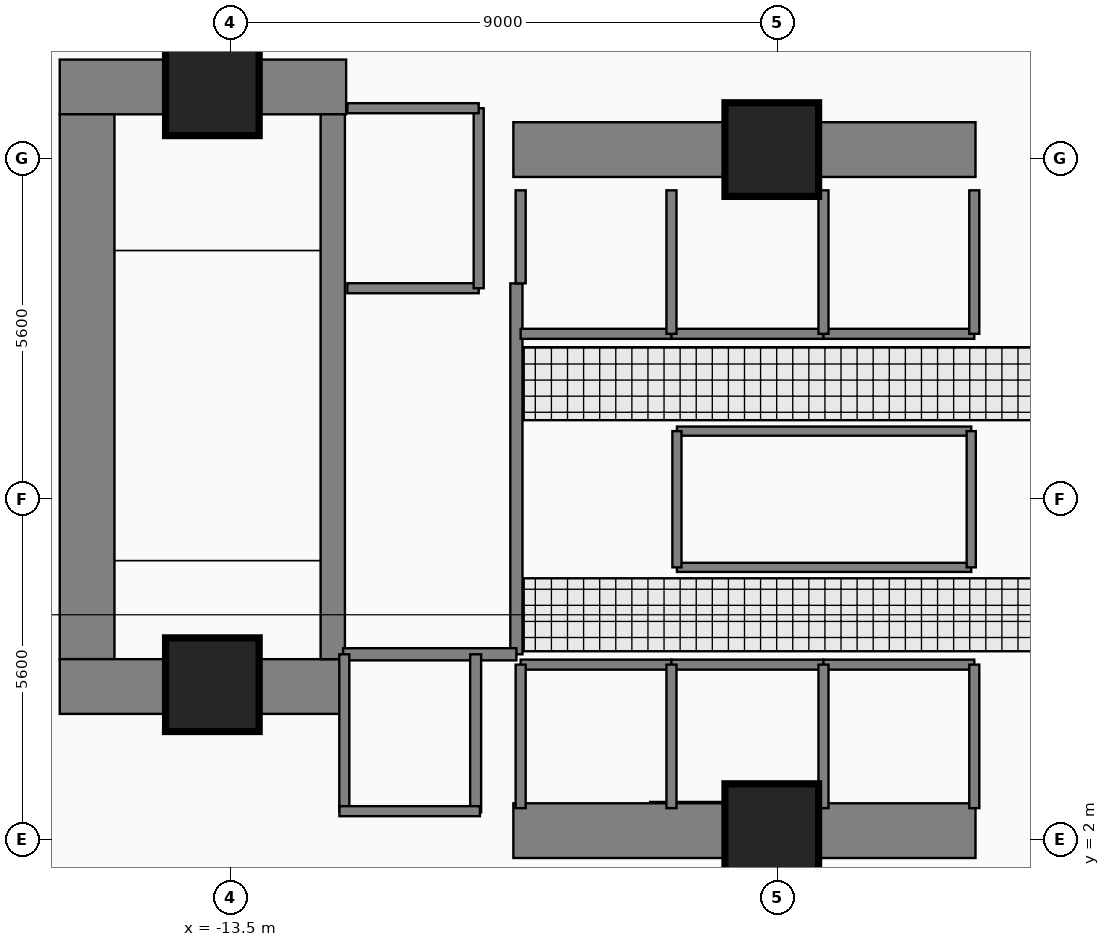
"""IFC4 building model, lengths in metres.
Left out: names, types, materials, properties, quantities, classifications, styles, units other than length and angle.
Written with IfcOpenShell. Run it as: python <this file> out.ifc"""

import sys

from ifc_helpers import new_model, si_unit, direction, frame, frame_2d, origin, origin_2d, place, context, subcontext, project, spatial, rectangle, extrude, element, fill, save


model = new_model("IFC4")
c1 = context("Model", 3, precision=1e-05, world=origin(), true_north=direction((0.0, 1.0)))
c2 = subcontext(c1, "Body", "Model", "MODEL_VIEW")
j1 = project(units=[si_unit("LENGTHUNIT", "METRE"), si_unit("PLANEANGLEUNIT", "RADIAN")], contexts=[c1])
p1 = place(None, origin())
s1 = spatial("IfcSite", under=j1, at=p1, CompositionType="ELEMENT")
p2 = place(p1, origin())
s2 = spatial("IfcBuilding", under=s1, at=p2, CompositionType="ELEMENT")
p3 = place(p2, origin())
s3 = spatial("IfcBuildingStorey", under=s2, at=p3, CompositionType="ELEMENT", Elevation=0.0)
p4 = place(p3, frame((-16.31, 14.38, 0.0), z_axis=(0.0, 0.0, 1.0), x_axis=(1.0, 0.0, 0.0)))
e1 = element("IfcWall", 1, at=p4, inside=s3, PredefinedType="SHEAR", context=c2, shape_type="SweptSolid", body=[
    extrude(rectangle(XDim=4.71, YDim=0.9, at=frame_2d((2.355, 0.0))), origin(), (0.0, 0.0, 1.0), 5.81),
])
p5 = place(p3, frame((-15.86, 4.97, 0.0), z_axis=(0.0, 0.0, 1.0), x_axis=(0.0, 1.0, 0.0)))
e2 = element("IfcWall", 2, at=p5, inside=s3, PredefinedType="SHEAR", context=c2, shape_type="SweptSolid", body=[
    extrude(rectangle(XDim=8.96, YDim=0.9, at=frame_2d((4.48, 0.0))), origin(), (0.0, 0.0, 1.0), 5.81),
])
p6 = place(p3, frame((-16.31, 4.52, 0.0), z_axis=(0.0, 0.0, 1.0), x_axis=(1.0, 0.0, 0.0)))
e3 = element("IfcWall", 3, at=p6, inside=s3, PredefinedType="SHEAR", context=c2, shape_type="SweptSolid", body=[
    extrude(rectangle(XDim=4.71, YDim=0.9, at=frame_2d((2.355, 0.0))), origin(), (0.0, 0.0, 1.0), 5.81),
])
for number, where, z_axis, x_axis in (
    (4, (-8.85, 2.15, 0.0), (0.0, 0.0, 1.0), (1.0, 0.0, 0.0)),
    (5, (-8.85, 13.35, 0.0), (0.0, 0.0, 1.0), (1.0, 0.0, 0.0)),
):
    element("IfcWall", number, at=place(p3, frame(where, z_axis=z_axis, x_axis=x_axis)), inside=s3, PredefinedType="SHEAR", context=c2, shape_type="SweptSolid", body=[
        extrude(rectangle(XDim=7.6, YDim=0.9, at=frame_2d((3.8, 0.0))), origin(), (0.0, 0.0, 1.0), 5.75),
    ])
p7 = place(p3, frame((-11.82, 4.97, 0.0), z_axis=(0.0, 0.0, 1.0), x_axis=(0.0, 1.0, 0.0)))
e6 = element("IfcWall", 6, at=p7, inside=s3, PredefinedType="SHEAR", context=c2, shape_type="SweptSolid", body=[
    extrude(rectangle(XDim=8.96, YDim=0.4, at=frame_2d((4.48, 0.0))), origin(), (0.0, 0.0, 1.0), 5.81),
])
p8 = place(p7, frame((0.31, 0.0, 0.0)))
e7 = element("IfcOpeningElement", 7, at=p8, cuts=e6, PredefinedType="OPENING", context=c2, shape_type="SweptSolid", body=[
    extrude(rectangle(XDim=1.12, YDim=2.22, at=frame_2d((0.56, 1.11))), frame((0.0, 0.21, 0.0), z_axis=(0.0, -1.0, 0.0), x_axis=(1.0, 0.0, 0.0)), (0.0, 0.0, 1.0), 0.42),
])
for number, where, z_axis, x_axis in (
    (8, (-13.8, 14.35, 0.0), (0.0, 0.0, 1.0), (1.0, 0.0, 0.0)),
    (9, (-4.6, 13.35, 0.0), (0.0, 0.0, 1.0), (1.0, 0.0, 0.0)),
    (10, (-13.8, 4.55, 0.0), (0.0, 0.0, 1.0), (1.0, 0.0, 0.0)),
    (11, (-4.6, 2.15, 0.0), (0.0, 0.0, 1.0), (1.0, 0.0, 0.0)),
):
    element("IfcColumn", number, at=place(p3, frame(where, z_axis=z_axis, x_axis=x_axis)), inside=s3, PredefinedType="COLUMN", context=c2, shape_type="SweptSolid", body=[
        extrude(rectangle(XDim=1.5, YDim=1.5, at=origin_2d()), origin(), (0.0, 0.0, 1.0), 6.0),
    ])
p9 = place(p3, frame((-8.8, 5.05, 0.0), z_axis=(0.0, 0.0, 1.0), x_axis=(0.0, 1.0, 0.0)))
e12 = element("IfcWall", 12, at=p9, inside=s3, PredefinedType="PARTITIONING", context=c2, shape_type="SweptSolid", body=[
    extrude(rectangle(XDim=6.1, YDim=0.2, at=frame_2d((3.05, 0.0))), origin(), (0.0, 0.0, 1.0), 5.75),
])
p10 = place(p9, frame((0.25, 0.0, 0.0)))
e13 = element("IfcOpeningElement", 13, at=p10, cuts=e12, PredefinedType="OPENING", context=c2, shape_type="SweptSolid", body=[
    extrude(rectangle(XDim=1.1, YDim=2.2, at=frame_2d((0.55, 1.1))), frame((0.0, 0.11, 0.0), z_axis=(0.0, -1.0, 0.0), x_axis=(1.0, 0.0, 0.0)), (0.0, 0.0, 1.0), 0.22),
])
p11 = place(p9, frame((3.85, 0.0, 0.0)))
e14 = element("IfcOpeningElement", 14, at=p11, cuts=e12, PredefinedType="OPENING", context=c2, shape_type="SweptSolid", body=[
    extrude(rectangle(XDim=1.1, YDim=2.2, at=frame_2d((0.55, 1.1))), frame((0.0, 0.11, 0.0), z_axis=(0.0, -1.0, 0.0), x_axis=(1.0, 0.0, 0.0)), (0.0, 0.0, 1.0), 0.22),
])
p12 = place(p3, frame((-11.58, 11.07, 0.0), z_axis=(0.0, 0.0, 1.0), x_axis=(1.0, 0.0, 0.0)))
e15 = element("IfcWall", 15, at=p12, inside=s3, PredefinedType="PARTITIONING", context=c2, shape_type="SweptSolid", body=[
    extrude(rectangle(XDim=2.16, YDim=0.165, at=frame_2d((1.08, 0.0))), origin(), (0.0, 0.0, 1.0), 5.75),
])
p13 = place(p12, frame((0.53, 0.0, 0.0)))
e16 = element("IfcOpeningElement", 16, at=p13, cuts=e15, PredefinedType="OPENING", context=c2, shape_type="SweptSolid", body=[
    extrude(rectangle(XDim=1.15, YDim=2.25, at=frame_2d((0.575, 1.125))), frame((0.0, 0.093, 0.0), z_axis=(0.0, -1.0, 0.0), x_axis=(1.0, 0.0, 0.0)), (0.0, 0.0, 1.0), 0.185),
])
p14 = place(p3, frame((-8.73, 4.88, 0.0), z_axis=(0.0, 0.0, 1.0), x_axis=(1.0, 0.0, 0.0)))
e17 = element("IfcWall", 17, at=p14, inside=s3, PredefinedType="PARTITIONING", context=c2, shape_type="SweptSolid", body=[
    extrude(rectangle(XDim=2.48, YDim=0.165, at=frame_2d((1.24, 0.0))), origin(), (0.0, 0.0, 1.0), 5.75),
])
p15 = place(p14, frame((0.69, 0.0, 0.0)))
e18 = element("IfcOpeningElement", 18, at=p15, cuts=e17, PredefinedType="OPENING", context=c2, shape_type="SweptSolid", body=[
    extrude(rectangle(XDim=1.1, YDim=2.25, at=frame_2d((0.55, 1.125))), frame((0.0, 0.093, 0.0), z_axis=(0.0, -1.0, 0.0), x_axis=(1.0, 0.0, 0.0)), (0.0, 0.0, 1.0), 0.185),
])
p16 = place(p3, frame((-6.25, 4.88, 0.0), z_axis=(0.0, 0.0, 1.0), x_axis=(1.0, 0.0, 0.0)))
e19 = element("IfcWall", 19, at=p16, inside=s3, PredefinedType="PARTITIONING", context=c2, shape_type="SweptSolid", body=[
    extrude(rectangle(XDim=2.5, YDim=0.165, at=frame_2d((1.25, 0.0))), origin(), (0.0, 0.0, 1.0), 5.75),
])
p17 = place(p16, frame((0.7, 0.0, 0.0)))
e20 = element("IfcOpeningElement", 20, at=p17, cuts=e19, PredefinedType="OPENING", context=c2, shape_type="SweptSolid", body=[
    extrude(rectangle(XDim=1.1, YDim=2.25, at=frame_2d((0.55, 1.125))), frame((0.0, 0.093, 0.0), z_axis=(0.0, -1.0, 0.0), x_axis=(1.0, 0.0, 0.0)), (0.0, 0.0, 1.0), 0.185),
])
p18 = place(p3, frame((-8.73, 10.32, 0.0), z_axis=(0.0, 0.0, 1.0), x_axis=(1.0, 0.0, 0.0)))
e21 = element("IfcWall", 21, at=p18, inside=s3, PredefinedType="PARTITIONING", context=c2, shape_type="SweptSolid", body=[
    extrude(rectangle(XDim=2.48, YDim=0.165, at=frame_2d((1.24, 0.0))), origin(), (0.0, 0.0, 1.0), 5.75),
])
p19 = place(p18, frame((0.69, 0.0, 0.0)))
e22 = element("IfcOpeningElement", 22, at=p19, cuts=e21, PredefinedType="OPENING", context=c2, shape_type="SweptSolid", body=[
    extrude(rectangle(XDim=1.1, YDim=2.25, at=frame_2d((0.55, 1.125))), frame((0.0, 0.093, 0.0), z_axis=(0.0, -1.0, 0.0), x_axis=(1.0, 0.0, 0.0)), (0.0, 0.0, 1.0), 0.185),
])
p20 = place(p3, frame((-6.25, 10.32, 0.0), z_axis=(0.0, 0.0, 1.0), x_axis=(1.0, 0.0, 0.0)))
e23 = element("IfcWall", 23, at=p20, inside=s3, PredefinedType="PARTITIONING", context=c2, shape_type="SweptSolid", body=[
    extrude(rectangle(XDim=2.5, YDim=0.165, at=frame_2d((1.25, 0.0))), origin(), (0.0, 0.0, 1.0), 5.75),
])
p21 = place(p20, frame((0.7, 0.0, 0.0)))
e24 = element("IfcOpeningElement", 24, at=p21, cuts=e23, PredefinedType="OPENING", context=c2, shape_type="SweptSolid", body=[
    extrude(rectangle(XDim=1.1, YDim=2.25, at=frame_2d((0.55, 1.125))), frame((0.0, 0.093, 0.0), z_axis=(0.0, -1.0, 0.0), x_axis=(1.0, 0.0, 0.0)), (0.0, 0.0, 1.0), 0.185),
])
p22 = place(p3, frame((-3.75, 4.88, 0.0), z_axis=(0.0, 0.0, 1.0), x_axis=(1.0, 0.0, 0.0)))
e25 = element("IfcWall", 25, at=p22, inside=s3, PredefinedType="PARTITIONING", context=c2, shape_type="SweptSolid", body=[
    extrude(rectangle(XDim=2.48, YDim=0.165, at=frame_2d((1.24, 0.0))), origin(), (0.0, 0.0, 1.0), 5.75),
])
p23 = place(p22, frame((0.69, 0.0, 0.0)))
e26 = element("IfcOpeningElement", 26, at=p23, cuts=e25, PredefinedType="OPENING", context=c2, shape_type="SweptSolid", body=[
    extrude(rectangle(XDim=1.1, YDim=2.25, at=frame_2d((0.55, 1.125))), frame((0.0, 0.093, 0.0), z_axis=(0.0, -1.0, 0.0), x_axis=(1.0, 0.0, 0.0)), (0.0, 0.0, 1.0), 0.185),
])
p24 = place(p3, frame((-3.75, 10.32, 0.0), z_axis=(0.0, 0.0, 1.0), x_axis=(1.0, 0.0, 0.0)))
e27 = element("IfcWall", 27, at=p24, inside=s3, PredefinedType="PARTITIONING", context=c2, shape_type="SweptSolid", body=[
    extrude(rectangle(XDim=2.48, YDim=0.165, at=frame_2d((1.24, 0.0))), origin(), (0.0, 0.0, 1.0), 5.75),
])
p25 = place(p24, frame((0.69, 0.0, 0.0)))
e28 = element("IfcOpeningElement", 28, at=p25, cuts=e27, PredefinedType="OPENING", context=c2, shape_type="SweptSolid", body=[
    extrude(rectangle(XDim=1.1, YDim=2.25, at=frame_2d((0.55, 1.125))), frame((0.0, 0.093, 0.0), z_axis=(0.0, -1.0, 0.0), x_axis=(1.0, 0.0, 0.0)), (0.0, 0.0, 1.0), 0.185),
])
p26 = place(p3, frame((-6.16, 6.48, 0.0), z_axis=(0.0, 0.0, 1.0), x_axis=(1.0, 0.0, 0.0)))
e29 = element("IfcWall", 29, at=p26, inside=s3, PredefinedType="PARTITIONING", context=c2, shape_type="SweptSolid", body=[
    extrude(rectangle(XDim=4.84, YDim=0.15, at=frame_2d((2.42, 0.0))), origin(), (0.0, 0.0, 1.0), 5.75),
])
p27 = place(p26, frame((1.97, 0.0, 0.0)))
e30 = element("IfcOpeningElement", 30, at=p27, cuts=e29, PredefinedType="OPENING", context=c2, shape_type="SweptSolid", body=[
    extrude(rectangle(XDim=0.9, YDim=2.15, at=frame_2d((0.45, 1.075))), frame((0.0, 0.085, 0.0), z_axis=(0.0, -1.0, 0.0), x_axis=(1.0, 0.0, 0.0)), (0.0, 0.0, 1.0), 0.17),
])
p28 = place(p3, frame((-11.65, 5.05, 0.0), z_axis=(0.0, 0.0, 1.0), x_axis=(1.0, 0.0, 0.0)))
e31 = element("IfcWall", 31, at=p28, inside=s3, PredefinedType="PARTITIONING", context=c2, shape_type="SweptSolid", body=[
    extrude(rectangle(XDim=2.85, YDim=0.2, at=frame_2d((1.425, 0.0))), origin(), (0.0, 0.0, 1.0), 5.75),
])
p29 = place(p3, frame((-9.42, 11.07, 0.0), z_axis=(0.0, 0.0, 1.0), x_axis=(0.0, 1.0, 0.0)))
e32 = element("IfcWall", 32, at=p29, inside=s3, PredefinedType="PARTITIONING", context=c2, shape_type="SweptSolid", body=[
    extrude(rectangle(XDim=2.96, YDim=0.165, at=frame_2d((1.48, 0.0))), origin(), (0.0, 0.0, 1.0), 5.75),
])
p30 = place(p3, frame((-11.58, 14.03, 0.0), z_axis=(0.0, 0.0, 1.0), x_axis=(1.0, 0.0, 0.0)))
e33 = element("IfcWall", 33, at=p30, inside=s3, PredefinedType="PARTITIONING", context=c2, shape_type="SweptSolid", body=[
    extrude(rectangle(XDim=2.16, YDim=0.165, at=frame_2d((1.08, 0.0))), origin(), (0.0, 0.0, 1.0), 5.75),
])
for number, where, z_axis, x_axis in (
    (34, (-8.73, 2.52, 0.0), (0.0, 0.0, 1.0), (0.0, 1.0, 0.0)),
    (35, (-6.25, 2.52, 0.0), (0.0, 0.0, 1.0), (0.0, 1.0, 0.0)),
    (36, (-3.75, 2.52, 0.0), (0.0, 0.0, 1.0), (0.0, 1.0, 0.0)),
):
    element("IfcWall", number, at=place(p3, frame(where, z_axis=z_axis, x_axis=x_axis)), inside=s3, PredefinedType="PARTITIONING", context=c2, shape_type="SweptSolid", body=[
        extrude(rectangle(XDim=2.36, YDim=0.165, at=frame_2d((1.18, 0.0))), origin(), (0.0, 0.0, 1.0), 5.75),
    ])
p31 = place(p3, frame((-8.73, 11.15, 0.0), z_axis=(0.0, 0.0, 1.0), x_axis=(0.0, 1.0, 0.0)))
e37 = element("IfcWall", 37, at=p31, inside=s3, PredefinedType="PARTITIONING", context=c2, shape_type="SweptSolid", body=[
    extrude(rectangle(XDim=1.53, YDim=0.165, at=frame_2d((0.765, 0.0))), origin(), (0.0, 0.0, 1.0), 5.75),
])
for number, where, z_axis, x_axis in (
    (38, (-6.25, 10.32, 0.0), (0.0, 0.0, 1.0), (0.0, 1.0, 0.0)),
    (39, (-3.75, 10.32, 0.0), (0.0, 0.0, 1.0), (0.0, 1.0, 0.0)),
    (40, (-1.27, 2.52, 0.0), (0.0, 0.0, 1.0), (0.0, 1.0, 0.0)),
    (41, (-1.27, 10.32, 0.0), (0.0, 0.0, 1.0), (0.0, 1.0, 0.0)),
):
    element("IfcWall", number, at=place(p3, frame(where, z_axis=z_axis, x_axis=x_axis)), inside=s3, PredefinedType="PARTITIONING", context=c2, shape_type="SweptSolid", body=[
        extrude(rectangle(XDim=2.36, YDim=0.165, at=frame_2d((1.18, 0.0))), origin(), (0.0, 0.0, 1.0), 5.75),
    ])
p32 = place(p3, frame((-9.47, 2.45, 0.0), z_axis=(0.0, 0.0, 1.0), x_axis=(0.0, 1.0, 0.0)))
e42 = element("IfcWall", 42, at=p32, inside=s3, PredefinedType="PARTITIONING", context=c2, shape_type="SweptSolid", body=[
    extrude(rectangle(XDim=2.6, YDim=0.18, at=frame_2d((1.3, 0.0))), origin(), (0.0, 0.0, 1.0), 5.75),
])
p33 = place(p3, frame((-11.63, 2.47, 0.0), z_axis=(0.0, 0.0, 1.0), x_axis=(0.0, 1.0, 0.0)))
e43 = element("IfcWall", 43, at=p33, inside=s3, PredefinedType="PARTITIONING", context=c2, shape_type="SweptSolid", body=[
    extrude(rectangle(XDim=2.58, YDim=0.165, at=frame_2d((1.29, 0.0))), origin(), (0.0, 0.0, 1.0), 5.75),
])
p34 = place(p3, frame((-11.71, 2.47, 0.0), z_axis=(0.0, 0.0, 1.0), x_axis=(1.0, 0.0, 0.0)))
e44 = element("IfcWall", 44, at=p34, inside=s3, PredefinedType="PARTITIONING", context=c2, shape_type="SweptSolid", body=[
    extrude(rectangle(XDim=2.31, YDim=0.165, at=frame_2d((1.155, 0.0))), origin(), (0.0, 0.0, 1.0), 4.35),
])
p35 = place(p3, frame((-6.16, 8.72, 0.0), z_axis=(0.0, 0.0, 1.0), x_axis=(1.0, 0.0, 0.0)))
e45 = element("IfcWall", 45, at=p35, inside=s3, PredefinedType="PARTITIONING", context=c2, shape_type="SweptSolid", body=[
    extrude(rectangle(XDim=4.84, YDim=0.15, at=frame_2d((2.42, 0.0))), origin(), (0.0, 0.0, 1.0), 5.75),
])
for number, where, z_axis, x_axis in (
    (46, (-6.16, 6.48, 0.0), (0.0, 0.0, 1.0), (0.0, 1.0, 0.0)),
    (47, (-1.32, 6.48, 0.0), (0.0, 0.0, 1.0), (0.0, 1.0, 0.0)),
):
    element("IfcWall", number, at=place(p3, frame(where, z_axis=z_axis, x_axis=x_axis)), inside=s3, PredefinedType="PARTITIONING", context=c2, shape_type="SweptSolid", body=[
        extrude(rectangle(XDim=2.24, YDim=0.15, at=frame_2d((1.12, 0.0))), origin(), (0.0, 0.0, 1.0), 5.75),
    ])
p36 = place(p8, origin())
e48 = element("IfcDoor", 48, at=p36, inside=s3, OperationType="SINGLE_SWING_LEFT", PredefinedType="DOOR", context=c2, shape_type="SweptSolid", body=[
    extrude(rectangle(XDim=1.12, YDim=2.22, at=frame_2d((0.56, 1.11))), frame((0.0, 0.025, 0.0), z_axis=(0.0, -1.0, 0.0), x_axis=(1.0, 0.0, 0.0)), (0.0, 0.0, 1.0), 0.05),
])
fill(e7, e48)
p37 = place(p10, origin())
e49 = element("IfcDoor", 49, at=p37, inside=s3, OperationType="SINGLE_SWING_RIGHT", PredefinedType="DOOR", context=c2, shape_type="SweptSolid", body=[
    extrude(rectangle(XDim=1.1, YDim=2.2, at=frame_2d((0.55, 1.1))), frame((0.0, 0.025, 0.0), z_axis=(0.0, -1.0, 0.0), x_axis=(1.0, 0.0, 0.0)), (0.0, 0.0, 1.0), 0.05),
])
fill(e13, e49)
p38 = place(p11, origin())
e50 = element("IfcDoor", 50, at=p38, inside=s3, OperationType="SINGLE_SWING_LEFT", PredefinedType="DOOR", context=c2, shape_type="SweptSolid", body=[
    extrude(rectangle(XDim=1.1, YDim=2.2, at=frame_2d((0.55, 1.1))), frame((0.0, 0.025, 0.0), z_axis=(0.0, -1.0, 0.0), x_axis=(1.0, 0.0, 0.0)), (0.0, 0.0, 1.0), 0.05),
])
fill(e14, e50)
p39 = place(p13, origin())
e51 = element("IfcDoor", 51, at=p39, inside=s3, OperationType="SLIDING_TO_LEFT", PredefinedType="DOOR", context=c2, shape_type="SweptSolid", body=[
    extrude(rectangle(XDim=1.15, YDim=2.25, at=frame_2d((0.575, 1.125))), frame((0.0, 0.025, 0.0), z_axis=(0.0, -1.0, 0.0), x_axis=(1.0, 0.0, 0.0)), (0.0, 0.0, 1.0), 0.05),
])
fill(e16, e51)
p40 = place(p15, origin())
e52 = element("IfcDoor", 52, at=p40, inside=s3, OperationType="SLIDING_TO_LEFT", PredefinedType="DOOR", context=c2, shape_type="SweptSolid", body=[
    extrude(rectangle(XDim=1.1, YDim=2.25, at=frame_2d((0.55, 1.125))), frame((0.0, 0.025, 0.0), z_axis=(0.0, -1.0, 0.0), x_axis=(1.0, 0.0, 0.0)), (0.0, 0.0, 1.0), 0.05),
])
fill(e18, e52)
p41 = place(p17, origin())
e53 = element("IfcDoor", 53, at=p41, inside=s3, OperationType="SLIDING_TO_LEFT", PredefinedType="DOOR", context=c2, shape_type="SweptSolid", body=[
    extrude(rectangle(XDim=1.1, YDim=2.25, at=frame_2d((0.55, 1.125))), frame((0.0, 0.025, 0.0), z_axis=(0.0, -1.0, 0.0), x_axis=(1.0, 0.0, 0.0)), (0.0, 0.0, 1.0), 0.05),
])
fill(e20, e53)
p42 = place(p19, origin())
e54 = element("IfcDoor", 54, at=p42, inside=s3, OperationType="SLIDING_TO_LEFT", PredefinedType="DOOR", context=c2, shape_type="SweptSolid", body=[
    extrude(rectangle(XDim=1.1, YDim=2.25, at=frame_2d((0.55, 1.125))), frame((0.0, 0.025, 0.0), z_axis=(0.0, -1.0, 0.0), x_axis=(1.0, 0.0, 0.0)), (0.0, 0.0, 1.0), 0.05),
])
fill(e22, e54)
p43 = place(p21, origin())
e55 = element("IfcDoor", 55, at=p43, inside=s3, OperationType="SLIDING_TO_LEFT", PredefinedType="DOOR", context=c2, shape_type="SweptSolid", body=[
    extrude(rectangle(XDim=1.1, YDim=2.25, at=frame_2d((0.55, 1.125))), frame((0.0, 0.025, 0.0), z_axis=(0.0, -1.0, 0.0), x_axis=(1.0, 0.0, 0.0)), (0.0, 0.0, 1.0), 0.05),
])
fill(e24, e55)
p44 = place(p23, origin())
e56 = element("IfcDoor", 56, at=p44, inside=s3, OperationType="SLIDING_TO_LEFT", PredefinedType="DOOR", context=c2, shape_type="SweptSolid", body=[
    extrude(rectangle(XDim=1.1, YDim=2.25, at=frame_2d((0.55, 1.125))), frame((0.0, 0.025, 0.0), z_axis=(0.0, -1.0, 0.0), x_axis=(1.0, 0.0, 0.0)), (0.0, 0.0, 1.0), 0.05),
])
fill(e26, e56)
p45 = place(p25, origin())
e57 = element("IfcDoor", 57, at=p45, inside=s3, OperationType="SLIDING_TO_LEFT", PredefinedType="DOOR", context=c2, shape_type="SweptSolid", body=[
    extrude(rectangle(XDim=1.1, YDim=2.25, at=frame_2d((0.55, 1.125))), frame((0.0, 0.025, 0.0), z_axis=(0.0, -1.0, 0.0), x_axis=(1.0, 0.0, 0.0)), (0.0, 0.0, 1.0), 0.05),
])
fill(e28, e57)
p46 = place(p27, origin())
e58 = element("IfcDoor", 58, at=p46, inside=s3, OperationType="SINGLE_SWING_RIGHT", PredefinedType="DOOR", context=c2, shape_type="SweptSolid", body=[
    extrude(rectangle(XDim=0.9, YDim=2.15, at=frame_2d((0.45, 1.075))), frame((0.0, 0.025, 0.0), z_axis=(0.0, -1.0, 0.0), x_axis=(1.0, 0.0, 0.0)), (0.0, 0.0, 1.0), 0.05),
])
fill(e30, e58)
save(model, sys.argv[1])
